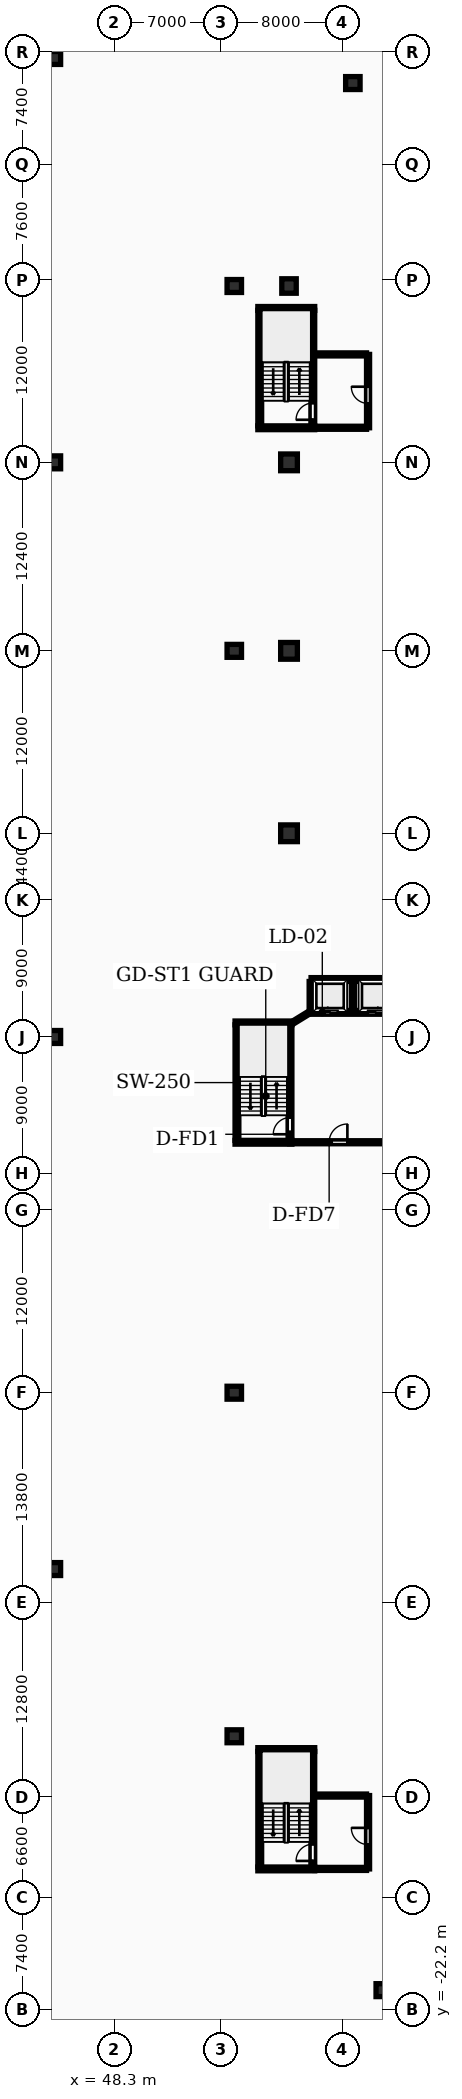
"""IFC4 building model, lengths in metres.
Left out: names, types, materials, properties, quantities, classifications, styles, units other than length and angle.
Written with IfcOpenShell. Run it as: python <this file> out.ifc"""

import sys

from ifc_helpers import new_model, si_unit, direction, frame, frame_2d, origin, origin_2d, place, context, subcontext, project, spatial, rectangle, circle, extrude, element, fill, save


model = new_model("IFC4")
c1 = context("Model", 3, precision=1e-05, world=origin(), true_north=direction((0.0, 1.0)))
c2 = subcontext(c1, "Body", "Model", "MODEL_VIEW")
j1 = project(units=[si_unit("LENGTHUNIT", "METRE"), si_unit("PLANEANGLEUNIT", "RADIAN")], contexts=[c1])
p1 = place(None, origin())
s1 = spatial("IfcSite", under=j1, at=p1, CompositionType="ELEMENT")
p2 = place(p1, origin())
s2 = spatial("IfcBuilding", under=s1, at=p2, CompositionType="ELEMENT")
p3 = place(p2, frame((0.0, 0.0, -10.8)))
s3 = spatial("IfcBuildingStorey", under=s2, at=p3, CompositionType="ELEMENT", Elevation=-10.8)
for number, where, z_axis, x_axis in (
    (1, (59.8, 55.2, -0.45), (0.0, 0.0, 1.0), (1.0, 0.0, 0.0)),
    (2, (59.8, 67.2, -0.45), (0.0, 0.0, 1.0), (1.0, 0.0, 0.0)),
    (3, (59.8, 79.6, -0.45), (0.0, 0.0, 1.0), (1.0, 0.0, 0.0)),
):
    element("IfcColumn", number, at=place(p3, frame(where, z_axis=z_axis, x_axis=x_axis)), inside=s3, PredefinedType="COLUMN", context=c2, shape_type="SweptSolid", body=[
        extrude(rectangle(XDim=1.1, YDim=1.1, at=origin_2d()), origin(), (0.0, 0.0, 1.0), 4.05),
    ])
p4 = place(p3, frame((59.8, 91.2, -0.45), z_axis=(0.0, 0.0, 1.0), x_axis=(1.0, 0.0, 0.0)))
e4 = element("IfcColumn", 4, at=p4, inside=s3, PredefinedType="COLUMN", context=c2, shape_type="SweptSolid", body=[
    extrude(circle(Radius=0.475, at=origin_2d()), origin(), (0.0, 0.0, 1.0), 4.05),
])
for number, where, z_axis, x_axis in (
    (5, (56.2, -4.2, -0.45), (0.0, 0.0, 1.0), (1.0, 0.0, 0.0)),
    (6, (56.2, 18.4, -0.45), (0.0, 0.0, 1.0), (1.0, 0.0, 0.0)),
    (7, (56.2, 67.2, -0.45), (0.0, 0.0, 1.0), (1.0, 0.0, 0.0)),
    (8, (56.2, 91.2, -0.45), (0.0, 0.0, 1.0), (1.0, 0.0, 0.0)),
    (9, (66.0, -20.9, -0.45), (0.0, 0.0, 1.0), (1.0, 0.0, 0.0)),
    (10, (64.0, 104.55, -0.45), (0.0, 0.0, 1.0), (1.0, 0.0, 0.0)),
    (11, (44.3, 6.8, -0.45), (0.0, 0.0, 1.0), (1.0, 0.0, 0.0)),
    (12, (44.3, 41.8, -0.45), (0.0, 0.0, 1.0), (1.0, 0.0, 0.0)),
    (13, (44.3, 79.6, -0.45), (0.0, 0.0, 1.0), (1.0, 0.0, 0.0)),
    (14, (44.3, 106.2, -0.45), (0.0, 0.0, 1.0), (1.0, 0.0, 0.0)),
):
    element("IfcColumn", number, at=place(p3, frame(where, z_axis=z_axis, x_axis=x_axis)), inside=s3, PredefinedType="COLUMN", context=c2, shape_type="SweptSolid", body=[
        extrude(rectangle(XDim=0.95, YDim=0.85, at=origin_2d()), origin(), (0.0, 0.0, 1.0), 4.05),
    ])
p5 = place(p3, frame((56.375, 35.0, 0.0), z_axis=(0.0, 0.0, 1.0), x_axis=(0.0, 1.0, 0.0)))
e15 = element("IfcWall", 15, at=p5, inside=s3, PredefinedType="SHEAR", context=c2, shape_type="SweptSolid", body=[
    extrude(rectangle(XDim=7.6, YDim=0.25, at=frame_2d((3.8, 0.0))), origin(), (0.0, 0.0, 1.0), 3.6),
])
for number, where, z_axis, x_axis in (
    (16, (56.25, 42.725, 0.0), (0.0, 0.0, 1.0), (1.0, 0.0, 0.0)),
    (17, (56.25, 34.875, 0.0), (0.0, 0.0, 1.0), (1.0, 0.0, 0.0)),
):
    element("IfcWall", number, at=place(p3, frame(where, z_axis=z_axis, x_axis=x_axis)), inside=s3, PredefinedType="SHEAR", context=c2, shape_type="SweptSolid", body=[
        extrude(rectangle(XDim=3.74, YDim=0.25, at=frame_2d((1.87, 0.0))), origin(), (0.0, 0.0, 1.0), 3.6),
    ])
p6 = place(p3, frame((59.865, 35.0, 0.0), z_axis=(0.0, 0.0, 1.0), x_axis=(0.0, 1.0, 0.0)))
e18 = element("IfcWall", 18, at=p6, inside=s3, PredefinedType="SHEAR", context=c2, shape_type="SweptSolid", body=[
    extrude(rectangle(XDim=7.6, YDim=0.25, at=frame_2d((3.8, 0.0))), origin(), (0.0, 0.0, 1.0), 3.6),
])
p7 = place(p6, frame((0.4, 0.0, 0.0)))
e19 = element("IfcOpeningElement", 19, at=p7, cuts=e18, PredefinedType="OPENING", context=c2, shape_type="SweptSolid", body=[
    extrude(rectangle(XDim=1.1, YDim=2.1, at=frame_2d((0.55, 1.05))), frame((0.0, 0.135, 0.0), z_axis=(0.0, -1.0, 0.0), x_axis=(1.0, 0.0, 0.0)), (0.0, 0.0, 1.0), 0.27),
])
p8 = place(p3, frame((61.25, 43.42, 0.0), z_axis=(0.0, 0.0, 1.0), x_axis=(1.0, 0.0, 0.0)))
e20 = element("IfcWall", 20, at=p8, inside=s3, PredefinedType="SHEAR", context=c2, shape_type="SweptSolid", body=[
    extrude(rectangle(XDim=5.5, YDim=0.25, at=frame_2d((2.75, 0.0))), origin(), (0.0, 0.0, 1.0), 3.6),
])
p9 = place(p8, frame((0.74, 0.0, 0.0)))
e21 = element("IfcOpeningElement", 21, at=p9, cuts=e20, PredefinedType="OPENING", context=c2, shape_type="SweptSolid", body=[
    extrude(rectangle(XDim=1.02, YDim=2.12, at=frame_2d((0.51, 1.06))), frame((0.0, 0.135, 0.0), z_axis=(0.0, -1.0, 0.0), x_axis=(1.0, 0.0, 0.0)), (0.0, 0.0, 1.0), 0.27),
])
p10 = place(p8, frame((3.74, 0.0, 0.0)))
e22 = element("IfcOpeningElement", 22, at=p10, cuts=e20, PredefinedType="OPENING", context=c2, shape_type="SweptSolid", body=[
    extrude(rectangle(XDim=1.02, YDim=2.12, at=frame_2d((0.51, 1.06))), frame((0.0, 0.135, 0.0), z_axis=(0.0, -1.0, 0.0), x_axis=(1.0, 0.0, 0.0)), (0.0, 0.0, 1.0), 0.27),
])
p11 = place(p3, frame((61.25, 45.58, 0.0), z_axis=(0.0, 0.0, 1.0), x_axis=(1.0, 0.0, 0.0)))
e23 = element("IfcWall", 23, at=p11, inside=s3, PredefinedType="SHEAR", context=c2, shape_type="SweptSolid", body=[
    extrude(rectangle(XDim=5.5, YDim=0.25, at=frame_2d((2.75, 0.0))), origin(), (0.0, 0.0, 1.0), 3.6),
])
p12 = place(p3, frame((61.25, 43.55, 0.0), z_axis=(0.0, 0.0, 1.0), x_axis=(0.0, 1.0, 0.0)))
e24 = element("IfcWall", 24, at=p12, inside=s3, PredefinedType="SHEAR", context=c2, shape_type="SweptSolid", body=[
    extrude(rectangle(XDim=1.9, YDim=0.25, at=frame_2d((0.95, 0.0))), origin(), (0.0, 0.0, 1.0), 3.6),
])
p13 = place(p3, frame((64.0, 43.55, 0.0), z_axis=(0.0, 0.0, 1.0), x_axis=(0.0, 1.0, 0.0)))
e25 = element("IfcWall", 25, at=p13, inside=s3, PredefinedType="PARTITIONING", context=c2, shape_type="SweptSolid", body=[
    extrude(rectangle(XDim=1.9, YDim=0.2, at=frame_2d((0.95, 0.0))), origin(), (0.0, 0.0, 1.0), 3.3),
])
p14 = place(p3, frame((59.84, 34.875, 0.0), z_axis=(0.0, 0.0, 1.0), x_axis=(1.0, 0.0, 0.0)))
e26 = element("IfcWall", 26, at=p14, inside=s3, PredefinedType="PARTITIONING", context=c2, shape_type="SweptSolid", body=[
    extrude(rectangle(XDim=6.96, YDim=0.2, at=frame_2d((3.48, 0.0))), origin(), (0.0, 0.0, 1.0), 3.3),
])
p15 = place(p14, frame((2.6, 0.0, 0.0)))
e27 = element("IfcOpeningElement", 27, at=p15, cuts=e26, PredefinedType="OPENING", context=c2, shape_type="SweptSolid", body=[
    extrude(rectangle(XDim=1.2, YDim=2.18, at=frame_2d((0.6, 1.09))), frame((0.0, 0.11, 0.0), z_axis=(0.0, -1.0, 0.0), x_axis=(1.0, 0.0, 0.0)), (0.0, 0.0, 1.0), 0.22),
])
p16 = place(p3, frame((60.02, 42.725, 0.0), z_axis=(0.0, 0.0, 1.0), x_axis=(0.851822584555, 0.523830396638, 0.0)))
e28 = element("IfcWall", 28, at=p16, inside=s3, PredefinedType="PARTITIONING", context=c2, shape_type="SweptSolid", body=[
    extrude(rectangle(XDim=1.326, YDim=0.2, at=frame_2d((0.663, 0.0))), origin(), (0.0, 0.0, 1.0), 3.3),
])
p17 = place(p3, frame((57.875, -12.8, 0.0), z_axis=(0.0, 0.0, 1.0), x_axis=(0.0, 1.0, 0.0)))
e29 = element("IfcWall", 29, at=p17, inside=s3, PredefinedType="SHEAR", context=c2, shape_type="SweptSolid", body=[
    extrude(rectangle(XDim=7.6, YDim=0.25, at=frame_2d((3.8, 0.0))), origin(), (0.0, 0.0, 1.0), 3.6),
])
for number, where, z_axis, x_axis in (
    (30, (57.75, -12.925, 0.0), (0.0, 0.0, 1.0), (1.0, 0.0, 0.0)),
    (31, (57.75, -5.075, 0.0), (0.0, 0.0, 1.0), (1.0, 0.0, 0.0)),
):
    element("IfcWall", number, at=place(p3, frame(where, z_axis=z_axis, x_axis=x_axis)), inside=s3, PredefinedType="SHEAR", context=c2, shape_type="SweptSolid", body=[
        extrude(rectangle(XDim=3.74, YDim=0.25, at=frame_2d((1.87, 0.0))), origin(), (0.0, 0.0, 1.0), 3.6),
    ])
p18 = place(p3, frame((61.365, -12.8, 0.0), z_axis=(0.0, 0.0, 1.0), x_axis=(0.0, 1.0, 0.0)))
e32 = element("IfcWall", 32, at=p18, inside=s3, PredefinedType="SHEAR", context=c2, shape_type="SweptSolid", body=[
    extrude(rectangle(XDim=7.6, YDim=0.25, at=frame_2d((3.8, 0.0))), origin(), (0.0, 0.0, 1.0), 3.6),
])
p19 = place(p18, frame((0.4, 0.0, 0.0)))
e33 = element("IfcOpeningElement", 33, at=p19, cuts=e32, PredefinedType="OPENING", context=c2, shape_type="SweptSolid", body=[
    extrude(rectangle(XDim=1.1, YDim=2.1, at=frame_2d((0.55, 1.05))), frame((0.0, 0.135, 0.0), z_axis=(0.0, -1.0, 0.0), x_axis=(1.0, 0.0, 0.0)), (0.0, 0.0, 1.0), 0.27),
])
p20 = place(p3, frame((65.0, -12.925, 0.0), z_axis=(0.0, 0.0, 1.0), x_axis=(0.0, 1.0, 0.0)))
e34 = element("IfcWall", 34, at=p20, inside=s3, PredefinedType="PARTITIONING", context=c2, shape_type="SweptSolid", body=[
    extrude(rectangle(XDim=4.825, YDim=0.2, at=frame_2d((2.413, 0.0))), origin(), (0.0, 0.0, 1.0), 3.3),
])
p21 = place(p20, frame((1.6, 0.0, 0.0)))
e35 = element("IfcOpeningElement", 35, at=p21, cuts=e34, PredefinedType="OPENING", context=c2, shape_type="SweptSolid", body=[
    extrude(rectangle(XDim=1.1, YDim=2.15, at=frame_2d((0.55, 1.075))), frame((0.0, 0.11, 0.0), z_axis=(0.0, -1.0, 0.0), x_axis=(1.0, 0.0, 0.0)), (0.0, 0.0, 1.0), 0.22),
])
for number, where, z_axis, x_axis in (
    (36, (61.5, -12.925, 0.0), (0.0, 0.0, 1.0), (1.0, 0.0, 0.0)),
    (37, (61.5, -8.1, 0.0), (0.0, 0.0, 1.0), (1.0, 0.0, 0.0)),
):
    element("IfcWall", number, at=place(p3, frame(where, z_axis=z_axis, x_axis=x_axis)), inside=s3, PredefinedType="PARTITIONING", context=c2, shape_type="SweptSolid", body=[
        extrude(rectangle(XDim=3.4, YDim=0.2, at=frame_2d((1.7, 0.0))), origin(), (0.0, 0.0, 1.0), 3.3),
    ])
p22 = place(p3, frame((57.875, 82.0, 0.0), z_axis=(0.0, 0.0, 1.0), x_axis=(0.0, 1.0, 0.0)))
e38 = element("IfcWall", 38, at=p22, inside=s3, PredefinedType="SHEAR", context=c2, shape_type="SweptSolid", body=[
    extrude(rectangle(XDim=7.6, YDim=0.25, at=frame_2d((3.8, 0.0))), origin(), (0.0, 0.0, 1.0), 3.6),
])
for number, where, z_axis, x_axis in (
    (39, (57.75, 81.875, 0.0), (0.0, 0.0, 1.0), (1.0, 0.0, 0.0)),
    (40, (57.75, 89.725, 0.0), (0.0, 0.0, 1.0), (1.0, 0.0, 0.0)),
):
    element("IfcWall", number, at=place(p3, frame(where, z_axis=z_axis, x_axis=x_axis)), inside=s3, PredefinedType="SHEAR", context=c2, shape_type="SweptSolid", body=[
        extrude(rectangle(XDim=3.74, YDim=0.25, at=frame_2d((1.87, 0.0))), origin(), (0.0, 0.0, 1.0), 3.6),
    ])
p23 = place(p3, frame((61.365, 82.0, 0.0), z_axis=(0.0, 0.0, 1.0), x_axis=(0.0, 1.0, 0.0)))
e41 = element("IfcWall", 41, at=p23, inside=s3, PredefinedType="SHEAR", context=c2, shape_type="SweptSolid", body=[
    extrude(rectangle(XDim=7.6, YDim=0.25, at=frame_2d((3.8, 0.0))), origin(), (0.0, 0.0, 1.0), 3.6),
])
p24 = place(p23, frame((0.4, 0.0, 0.0)))
e42 = element("IfcOpeningElement", 42, at=p24, cuts=e41, PredefinedType="OPENING", context=c2, shape_type="SweptSolid", body=[
    extrude(rectangle(XDim=1.1, YDim=2.1, at=frame_2d((0.55, 1.05))), frame((0.0, 0.135, 0.0), z_axis=(0.0, -1.0, 0.0), x_axis=(1.0, 0.0, 0.0)), (0.0, 0.0, 1.0), 0.27),
])
p25 = place(p3, frame((65.0, 81.875, 0.0), z_axis=(0.0, 0.0, 1.0), x_axis=(0.0, 1.0, 0.0)))
e43 = element("IfcWall", 43, at=p25, inside=s3, PredefinedType="PARTITIONING", context=c2, shape_type="SweptSolid", body=[
    extrude(rectangle(XDim=4.825, YDim=0.2, at=frame_2d((2.413, 0.0))), origin(), (0.0, 0.0, 1.0), 3.3),
])
p26 = place(p25, frame((1.6, 0.0, 0.0)))
e44 = element("IfcOpeningElement", 44, at=p26, cuts=e43, PredefinedType="OPENING", context=c2, shape_type="SweptSolid", body=[
    extrude(rectangle(XDim=1.1, YDim=2.15, at=frame_2d((0.55, 1.075))), frame((0.0, 0.11, 0.0), z_axis=(0.0, -1.0, 0.0), x_axis=(1.0, 0.0, 0.0)), (0.0, 0.0, 1.0), 0.22),
])
for number, where, z_axis, x_axis in (
    (45, (61.5, 81.875, 0.0), (0.0, 0.0, 1.0), (1.0, 0.0, 0.0)),
    (46, (61.5, 86.7, 0.0), (0.0, 0.0, 1.0), (1.0, 0.0, 0.0)),
):
    element("IfcWall", number, at=place(p3, frame(where, z_axis=z_axis, x_axis=x_axis)), inside=s3, PredefinedType="PARTITIONING", context=c2, shape_type="SweptSolid", body=[
        extrude(rectangle(XDim=3.4, YDim=0.2, at=frame_2d((1.7, 0.0))), origin(), (0.0, 0.0, 1.0), 3.3),
    ])
p27 = place(p7, origin())
e47 = element("IfcDoor", 47, at=p27, inside=s3, OperationType="SINGLE_SWING_LEFT", PredefinedType="DOOR", context=c2, shape_type="SweptSolid", body=[
    extrude(rectangle(XDim=1.1, YDim=2.1, at=frame_2d((0.55, 1.05))), frame((0.0, 0.025, 0.0), z_axis=(0.0, -1.0, 0.0), x_axis=(1.0, 0.0, 0.0)), (0.0, 0.0, 1.0), 0.05),
])
fill(e19, e47)
p28 = place(p9, origin())
e48 = element("IfcDoor", 48, at=p28, inside=s3, OperationType="SLIDING_TO_LEFT", PredefinedType="DOOR", context=c2, shape_type="SweptSolid", body=[
    extrude(rectangle(XDim=1.02, YDim=2.12, at=frame_2d((0.51, 1.06))), frame((0.0, 0.025, 0.0), z_axis=(0.0, -1.0, 0.0), x_axis=(1.0, 0.0, 0.0)), (0.0, 0.0, 1.0), 0.05),
])
fill(e21, e48)
p29 = place(p10, origin())
e49 = element("IfcDoor", 49, at=p29, inside=s3, OperationType="SLIDING_TO_RIGHT", PredefinedType="DOOR", context=c2, shape_type="SweptSolid", body=[
    extrude(rectangle(XDim=1.02, YDim=2.12, at=frame_2d((0.51, 1.06))), frame((0.0, 0.025, 0.0), z_axis=(0.0, -1.0, 0.0), x_axis=(1.0, 0.0, 0.0)), (0.0, 0.0, 1.0), 0.05),
])
fill(e22, e49)
p30 = place(p15, origin())
e50 = element("IfcDoor", 50, at=p30, inside=s3, OperationType="SINGLE_SWING_RIGHT", PredefinedType="DOOR", context=c2, shape_type="SweptSolid", body=[
    extrude(rectangle(XDim=1.2, YDim=2.18, at=frame_2d((0.6, 1.09))), frame((0.0, 0.025, 0.0), z_axis=(0.0, -1.0, 0.0), x_axis=(1.0, 0.0, 0.0)), (0.0, 0.0, 1.0), 0.05),
])
fill(e27, e50)
p31 = place(p19, origin())
e51 = element("IfcDoor", 51, at=p31, inside=s3, OperationType="SINGLE_SWING_LEFT", PredefinedType="DOOR", context=c2, shape_type="SweptSolid", body=[
    extrude(rectangle(XDim=1.1, YDim=2.1, at=frame_2d((0.55, 1.05))), frame((0.0, 0.025, 0.0), z_axis=(0.0, -1.0, 0.0), x_axis=(1.0, 0.0, 0.0)), (0.0, 0.0, 1.0), 0.05),
])
fill(e33, e51)
p32 = place(p21, origin())
e52 = element("IfcDoor", 52, at=p32, inside=s3, OperationType="SINGLE_SWING_RIGHT", PredefinedType="DOOR", context=c2, shape_type="SweptSolid", body=[
    extrude(rectangle(XDim=1.1, YDim=2.15, at=frame_2d((0.55, 1.075))), frame((0.0, 0.025, 0.0), z_axis=(0.0, -1.0, 0.0), x_axis=(1.0, 0.0, 0.0)), (0.0, 0.0, 1.0), 0.05),
])
fill(e35, e52)
p33 = place(p24, origin())
e53 = element("IfcDoor", 53, at=p33, inside=s3, OperationType="SINGLE_SWING_LEFT", PredefinedType="DOOR", context=c2, shape_type="SweptSolid", body=[
    extrude(rectangle(XDim=1.1, YDim=2.1, at=frame_2d((0.55, 1.05))), frame((0.0, 0.025, 0.0), z_axis=(0.0, -1.0, 0.0), x_axis=(1.0, 0.0, 0.0)), (0.0, 0.0, 1.0), 0.05),
])
fill(e42, e53)
p34 = place(p26, origin())
e54 = element("IfcDoor", 54, at=p34, inside=s3, OperationType="SINGLE_SWING_RIGHT", PredefinedType="DOOR", context=c2, shape_type="SweptSolid", body=[
    extrude(rectangle(XDim=1.1, YDim=2.15, at=frame_2d((0.55, 1.075))), frame((0.0, 0.025, 0.0), z_axis=(0.0, -1.0, 0.0), x_axis=(1.0, 0.0, 0.0)), (0.0, 0.0, 1.0), 0.05),
])
fill(e44, e54)
save(model, sys.argv[1])
